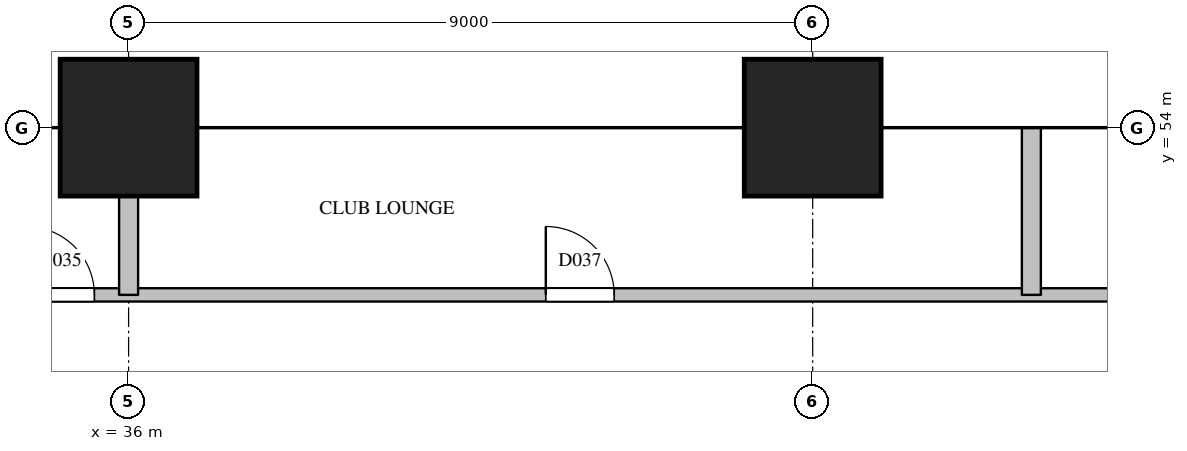
"""IFC4 building model, lengths in metres.
Left out: names, types, materials, properties, quantities, classifications, styles, units other than length and angle.
Written with IfcOpenShell. Run it as: python <this file> out.ifc"""

import sys

from ifc_helpers import new_model, si_unit, direction, frame, frame_2d, origin, origin_2d, place, context, subcontext, project, spatial, rectangle, extrude, element, fill, save


model = new_model("IFC4")
c1 = context("Model", 3, precision=1e-05, world=origin(), true_north=direction((0.0, 1.0)))
c2 = subcontext(c1, "Body", "Model", "MODEL_VIEW")
j1 = project(units=[si_unit("LENGTHUNIT", "METRE"), si_unit("PLANEANGLEUNIT", "RADIAN")], contexts=[c1])
p1 = place(None, origin())
s1 = spatial("IfcSite", under=j1, at=p1, CompositionType="ELEMENT")
p2 = place(p1, origin())
s2 = spatial("IfcBuilding", under=s1, at=p2, CompositionType="ELEMENT")
p3 = place(p2, frame((0.0, 0.0, 112.0)))
s3 = spatial("IfcBuildingStorey", under=s2, at=p3, CompositionType="ELEMENT", Elevation=112.0)
for number, where, z_axis, x_axis in (
    (1, (36.0, 54.0, 0.0), (0.0, 0.0, 1.0), (1.0, 0.0, 0.0)),
    (2, (45.0, 54.0, 0.0), (0.0, 0.0, 1.0), (1.0, 0.0, 0.0)),
):
    element("IfcColumn", number, at=place(p3, frame(where, z_axis=z_axis, x_axis=x_axis)), inside=s3, PredefinedType="COLUMN", context=c2, shape_type="SweptSolid", body=[
        extrude(rectangle(XDim=1.8, YDim=1.8, at=origin_2d()), origin(), (0.0, 0.0, 1.0), 3.8),
    ])
p4 = place(p3, frame((34.2, 51.8, 0.0), z_axis=(0.0, 0.0, 1.0), x_axis=(1.0, 0.0, 0.0)))
e3 = element("IfcWall", 3, at=p4, inside=s3, PredefinedType="PARTITIONING", context=c2, shape_type="SweptSolid", body=[
    extrude(rectangle(XDim=16.0, YDim=0.175, at=frame_2d((8.0, 0.0))), origin(), (0.0, 0.0, 1.0), 3.5),
])
p5 = place(p4, frame((0.45, 0.0, 0.0)))
e4 = element("IfcOpeningElement", 4, at=p5, cuts=e3, PredefinedType="OPENING", context=c2, shape_type="SweptSolid", body=[
    extrude(rectangle(XDim=0.9, YDim=2.1, at=frame_2d((0.45, 1.05))), frame((0.0, 0.097, 0.0), z_axis=(0.0, -1.0, 0.0), x_axis=(1.0, 0.0, 0.0)), (0.0, 0.0, 1.0), 0.195),
])
p6 = place(p4, frame((7.289, 0.0, 0.0)))
e5 = element("IfcOpeningElement", 5, at=p6, cuts=e3, PredefinedType="OPENING", context=c2, shape_type="SweptSolid", body=[
    extrude(rectangle(XDim=0.9, YDim=2.1, at=frame_2d((0.45, 1.05))), frame((0.0, 0.097, 0.0), z_axis=(0.0, -1.0, 0.0), x_axis=(1.0, 0.0, 0.0)), (0.0, 0.0, 1.0), 0.195),
])
p7 = place(p3, frame((36.0, 51.8, 0.0), z_axis=(0.0, 0.0, 1.0), x_axis=(0.0, 1.0, 0.0)))
e6 = element("IfcWall", 6, at=p7, inside=s3, PredefinedType="PARTITIONING", context=c2, shape_type="SweptSolid", body=[
    extrude(rectangle(XDim=2.2, YDim=0.25, at=frame_2d((1.1, 0.0))), origin(), (0.0, 0.0, 1.0), 3.5),
])
p8 = place(p3, frame((47.877, 51.8, 0.0), z_axis=(0.0, 0.0, 1.0), x_axis=(0.0, 1.0, 0.0)))
e7 = element("IfcWall", 7, at=p8, inside=s3, PredefinedType="PARTITIONING", context=c2, shape_type="SweptSolid", body=[
    extrude(rectangle(XDim=2.2, YDim=0.25, at=frame_2d((1.1, 0.0))), origin(), (0.0, 0.0, 1.0), 2.5),
])
p9 = place(p5, origin())
e8 = element("IfcDoor", 8, at=p9, inside=s3, OperationType="SINGLE_SWING_LEFT", PredefinedType="DOOR", context=c2, shape_type="SweptSolid", body=[
    extrude(rectangle(XDim=0.9, YDim=2.1, at=frame_2d((0.45, 1.05))), frame((0.0, 0.025, 0.0), z_axis=(0.0, -1.0, 0.0), x_axis=(1.0, 0.0, 0.0)), (0.0, 0.0, 1.0), 0.05),
])
fill(e4, e8)
p10 = place(p6, origin())
e9 = element("IfcDoor", 9, at=p10, inside=s3, OperationType="SINGLE_SWING_LEFT", PredefinedType="DOOR", context=c2, shape_type="SweptSolid", body=[
    extrude(rectangle(XDim=0.9, YDim=2.1, at=frame_2d((0.45, 1.05))), frame((0.0, 0.025, 0.0), z_axis=(0.0, -1.0, 0.0), x_axis=(1.0, 0.0, 0.0)), (0.0, 0.0, 1.0), 0.05),
])
fill(e5, e9)
save(model, sys.argv[1])
